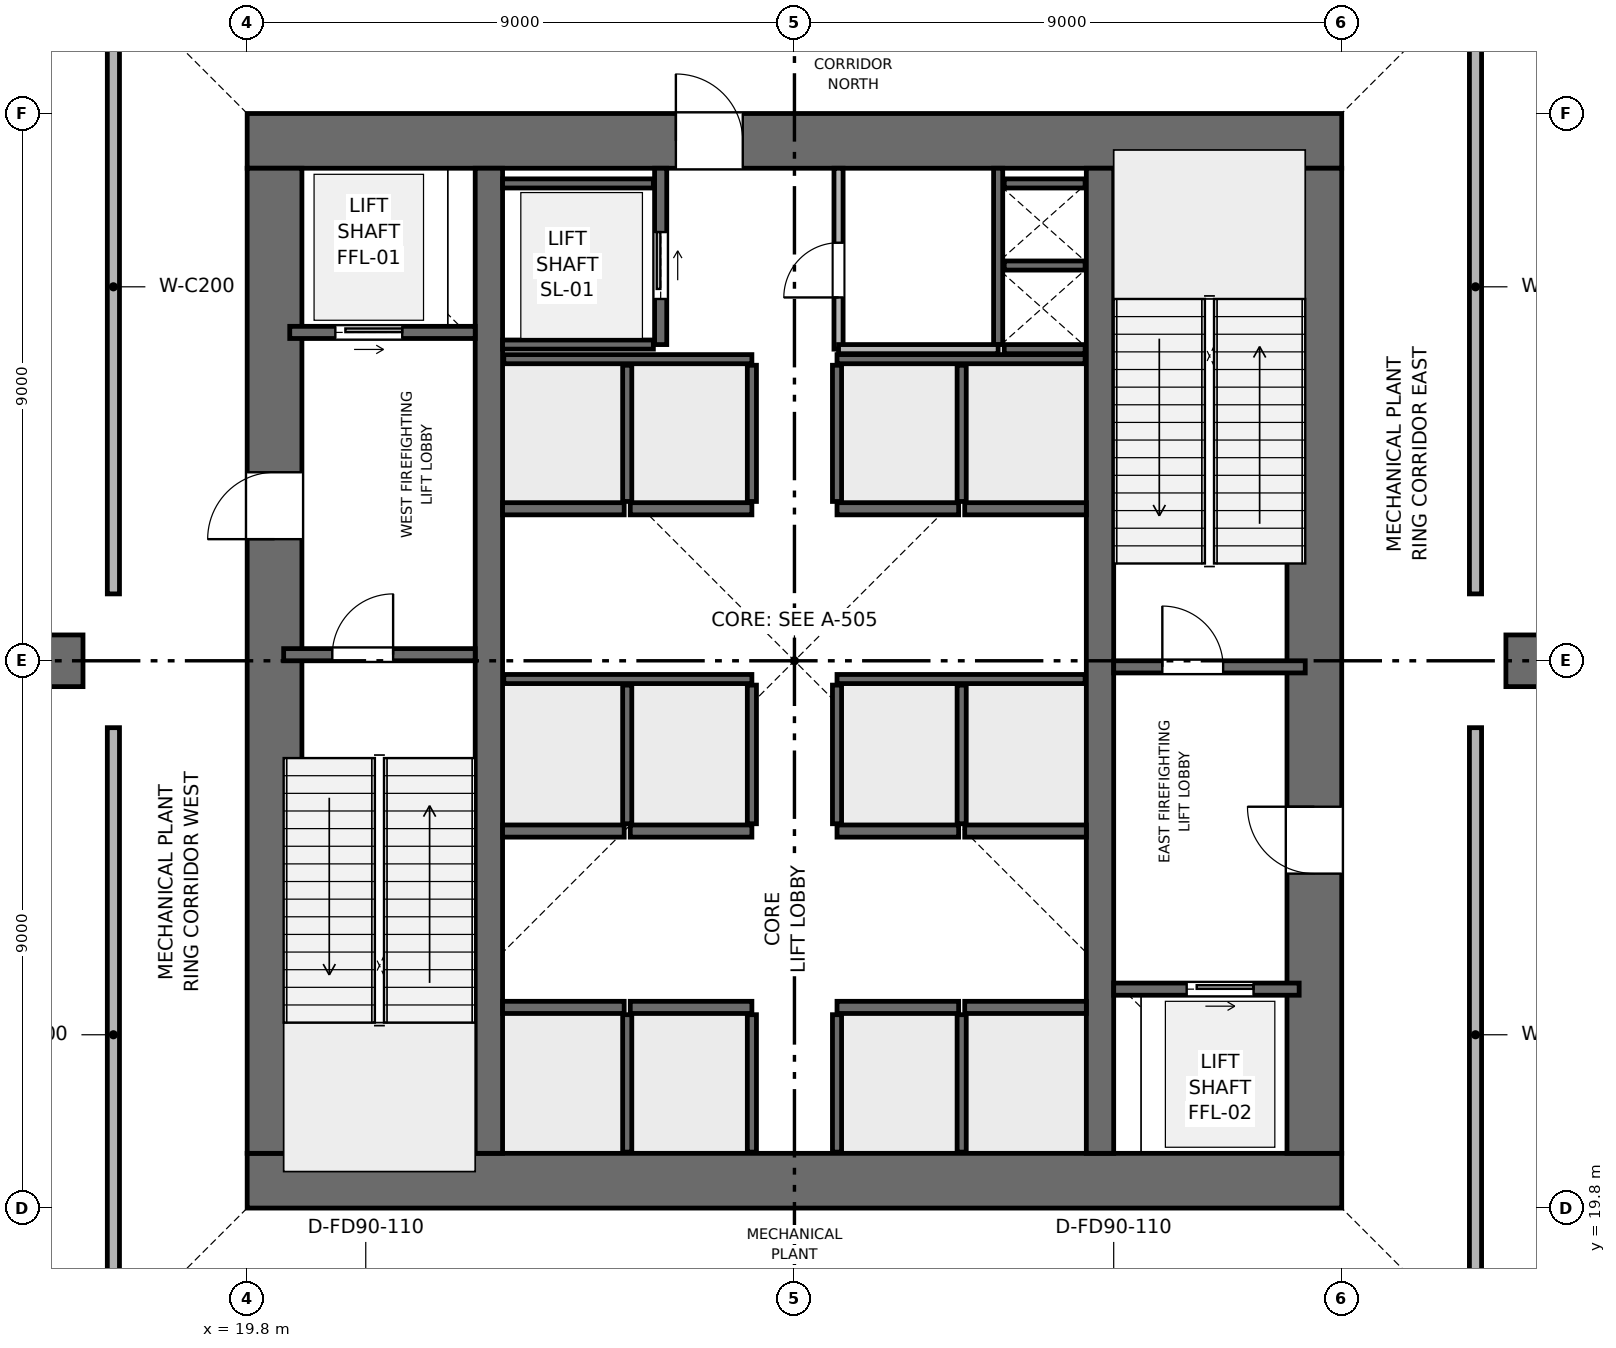
"""IFC4 building model, lengths in metres.
Left out: names, types, materials, properties, quantities, classifications, styles, units other than length and angle.
Written with IfcOpenShell. Run it as: python <this file> out.ifc"""

import sys

from ifc_helpers import new_model, si_unit, direction, frame, frame_2d, origin, place, context, subcontext, project, spatial, rectangle, extrude, element, fill, save


model = new_model("IFC4")
c1 = context("Model", 3, precision=1e-05, world=origin(), true_north=direction((0.0, 1.0)))
c2 = subcontext(c1, "Body", "Model", "MODEL_VIEW")
j1 = project(units=[si_unit("LENGTHUNIT", "METRE"), si_unit("PLANEANGLEUNIT", "RADIAN")], contexts=[c1])
p1 = place(None, origin())
s1 = spatial("IfcSite", under=j1, at=p1, CompositionType="ELEMENT")
p2 = place(p1, origin())
s2 = spatial("IfcBuilding", under=s1, at=p2, CompositionType="ELEMENT")
p3 = place(p2, frame((0.0, 0.0, 108.0)))
s3 = spatial("IfcBuildingStorey", under=s2, at=p3, CompositionType="ELEMENT", Elevation=108.0)
p4 = place(p3, frame((19.8, 20.25, 0.0), z_axis=(0.0, 0.0, 1.0), x_axis=(1.0, 0.0, 0.0)))
e1 = element("IfcWall", 1, at=p4, inside=s3, PredefinedType="SHEAR", context=c2, shape_type="SweptSolid", body=[
    extrude(rectangle(XDim=18.0, YDim=0.9, at=frame_2d((9.0, 0.0))), origin(), (0.0, 0.0, 1.0), 5.4),
])
p5 = place(p3, frame((19.8, 37.35, 0.0), z_axis=(0.0, 0.0, 1.0), x_axis=(1.0, 0.0, 0.0)))
e2 = element("IfcWall", 2, at=p5, inside=s3, PredefinedType="SHEAR", context=c2, shape_type="SweptSolid", body=[
    extrude(rectangle(XDim=18.0, YDim=0.9, at=frame_2d((9.0, 0.0))), origin(), (0.0, 0.0, 1.0), 5.4),
])
p6 = place(p5, frame((7.05, 0.0, 0.0)))
e3 = element("IfcOpeningElement", 3, at=p6, cuts=e2, PredefinedType="OPENING", context=c2, shape_type="SweptSolid", body=[
    extrude(rectangle(XDim=1.1, YDim=2.15, at=frame_2d((0.55, 1.075))), frame((0.0, 0.46, 0.0), z_axis=(0.0, -1.0, 0.0), x_axis=(1.0, 0.0, 0.0)), (0.0, 0.0, 1.0), 0.92),
])
p7 = place(p3, frame((20.25, 20.7, 0.0), z_axis=(0.0, 0.0, 1.0), x_axis=(0.0, 1.0, 0.0)))
e4 = element("IfcWall", 4, at=p7, inside=s3, PredefinedType="SHEAR", context=c2, shape_type="SweptSolid", body=[
    extrude(rectangle(XDim=16.2, YDim=0.9, at=frame_2d((8.1, 0.0))), origin(), (0.0, 0.0, 1.0), 5.4),
])
p8 = place(p7, frame((10.1, 0.0, 0.0)))
e5 = element("IfcOpeningElement", 5, at=p8, cuts=e4, PredefinedType="OPENING", context=c2, shape_type="SweptSolid", body=[
    extrude(rectangle(XDim=1.1, YDim=2.15, at=frame_2d((0.55, 1.075))), frame((0.0, 0.46, 0.0), z_axis=(0.0, -1.0, 0.0), x_axis=(1.0, 0.0, 0.0)), (0.0, 0.0, 1.0), 0.92),
])
p9 = place(p3, frame((37.35, 20.7, 0.0), z_axis=(0.0, 0.0, 1.0), x_axis=(0.0, 1.0, 0.0)))
e6 = element("IfcWall", 6, at=p9, inside=s3, PredefinedType="SHEAR", context=c2, shape_type="SweptSolid", body=[
    extrude(rectangle(XDim=16.2, YDim=0.9, at=frame_2d((8.1, 0.0))), origin(), (0.0, 0.0, 1.0), 5.4),
])
p10 = place(p9, frame((4.6, 0.0, 0.0)))
e7 = element("IfcOpeningElement", 7, at=p10, cuts=e6, PredefinedType="OPENING", context=c2, shape_type="SweptSolid", body=[
    extrude(rectangle(XDim=1.1, YDim=2.15, at=frame_2d((0.55, 1.075))), frame((0.0, 0.46, 0.0), z_axis=(0.0, -1.0, 0.0), x_axis=(1.0, 0.0, 0.0)), (0.0, 0.0, 1.0), 0.92),
])
for number, where, z_axis, x_axis in (
    (8, (23.775, 20.7, 0.0), (0.0, 0.0, 1.0), (0.0, 1.0, 0.0)),
    (9, (33.825, 20.7, 0.0), (0.0, 0.0, 1.0), (0.0, 1.0, 0.0)),
):
    element("IfcWall", number, at=place(p3, frame(where, z_axis=z_axis, x_axis=x_axis)), inside=s3, PredefinedType="SHEAR", context=c2, shape_type="SweptSolid", body=[
        extrude(rectangle(XDim=16.2, YDim=0.45, at=frame_2d((8.1, 0.0))), origin(), (0.0, 0.0, 1.0), 5.4),
    ])
for number, where, z_axis, x_axis in (
    (10, (17.1, 28.8, 0.0), (0.0, 0.0, 1.0), (-1.0, 0.0, 0.0)),
    (11, (40.5, 28.8, 0.0), (0.0, 0.0, 1.0), (1.0, 0.0, 0.0)),
):
    element("IfcWall", number, at=place(p3, frame(where, z_axis=z_axis, x_axis=x_axis)), inside=s3, PredefinedType="SHEAR", context=c2, shape_type="SweptSolid", body=[
        extrude(rectangle(XDim=12.55, YDim=0.85, at=frame_2d((6.275, 0.0))), origin(), (0.0, 0.0, 1.0), 5.15),
    ])
p11 = place(p3, frame((20.4, 28.9, 0.0), z_axis=(0.0, 0.0, 1.0), x_axis=(1.0, 0.0, 0.0)))
e12 = element("IfcWall", 12, at=p11, inside=s3, PredefinedType="SHEAR", context=c2, shape_type="SweptSolid", body=[
    extrude(rectangle(XDim=3.15, YDim=0.2, at=frame_2d((1.575, 0.0))), origin(), (0.0, 0.0, 1.0), 5.15),
])
p12 = place(p11, frame((0.8, 0.0, 0.0)))
e13 = element("IfcOpeningElement", 13, at=p12, cuts=e12, PredefinedType="OPENING", context=c2, shape_type="SweptSolid", body=[
    extrude(rectangle(XDim=1.0, YDim=2.1, at=frame_2d((0.5, 1.05))), frame((0.0, 0.11, 0.0), z_axis=(0.0, -1.0, 0.0), x_axis=(1.0, 0.0, 0.0)), (0.0, 0.0, 1.0), 0.22),
])
p13 = place(p3, frame((34.05, 28.7, 0.0), z_axis=(0.0, 0.0, 1.0), x_axis=(1.0, 0.0, 0.0)))
e14 = element("IfcWall", 14, at=p13, inside=s3, PredefinedType="SHEAR", context=c2, shape_type="SweptSolid", body=[
    extrude(rectangle(XDim=3.15, YDim=0.2, at=frame_2d((1.575, 0.0))), origin(), (0.0, 0.0, 1.0), 5.15),
])
p14 = place(p13, frame((0.8, 0.0, 0.0)))
e15 = element("IfcOpeningElement", 15, at=p14, cuts=e14, PredefinedType="OPENING", context=c2, shape_type="SweptSolid", body=[
    extrude(rectangle(XDim=1.0, YDim=2.1, at=frame_2d((0.5, 1.05))), frame((0.0, 0.11, 0.0), z_axis=(0.0, -1.0, 0.0), x_axis=(1.0, 0.0, 0.0)), (0.0, 0.0, 1.0), 0.22),
])
p15 = place(p3, frame((32.15, 34.0, 0.0), z_axis=(0.0, 0.0, 1.0), x_axis=(0.0, 1.0, 0.0)))
e16 = element("IfcWall", 16, at=p15, inside=s3, PredefinedType="SHEAR", context=c2, shape_type="SweptSolid", body=[
    extrude(rectangle(XDim=2.9, YDim=0.15, at=frame_2d((1.45, 0.0))), origin(), (0.0, 0.0, 1.0), 5.15),
])
for number, where, z_axis, x_axis in (
    (17, (32.25, 33.925, 0.0), (0.0, 0.0, 1.0), (1.0, 0.0, 0.0)),
    (18, (32.25, 35.3, 0.0), (0.0, 0.0, 1.0), (1.0, 0.0, 0.0)),
):
    element("IfcWall", number, at=place(p3, frame(where, z_axis=z_axis, x_axis=x_axis)), inside=s3, PredefinedType="SHEAR", context=c2, shape_type="SweptSolid", body=[
        extrude(rectangle(XDim=1.33, YDim=0.15, at=frame_2d((0.665, 0.0))), origin(), (0.0, 0.0, 1.0), 5.15),
    ])
p16 = place(p3, frame((20.5, 34.2, 0.0), z_axis=(0.0, 0.0, 1.0), x_axis=(1.0, 0.0, 0.0)))
e19 = element("IfcWall", 19, at=p16, inside=s3, PredefinedType="SHEAR", context=c2, shape_type="SweptSolid", body=[
    extrude(rectangle(XDim=3.05, YDim=0.2, at=frame_2d((1.525, 0.0))), origin(), (0.0, 0.0, 1.0), 5.15),
])
p17 = place(p16, frame((0.75, 0.0, 0.0)))
e20 = element("IfcOpeningElement", 20, at=p17, cuts=e19, PredefinedType="OPENING", context=c2, shape_type="SweptSolid", body=[
    extrude(rectangle(XDim=1.1, YDim=2.15, at=frame_2d((0.55, 1.075))), frame((0.0, 0.11, 0.0), z_axis=(0.0, -1.0, 0.0), x_axis=(1.0, 0.0, 0.0)), (0.0, 0.0, 1.0), 0.22),
])
p18 = place(p3, frame((34.05, 23.4, 0.0), z_axis=(0.0, 0.0, 1.0), x_axis=(1.0, 0.0, 0.0)))
e21 = element("IfcWall", 21, at=p18, inside=s3, PredefinedType="SHEAR", context=c2, shape_type="SweptSolid", body=[
    extrude(rectangle(XDim=3.05, YDim=0.2, at=frame_2d((1.525, 0.0))), origin(), (0.0, 0.0, 1.0), 5.15),
])
p19 = place(p18, frame((1.2, 0.0, 0.0)))
e22 = element("IfcOpeningElement", 22, at=p19, cuts=e21, PredefinedType="OPENING", context=c2, shape_type="SweptSolid", body=[
    extrude(rectangle(XDim=1.1, YDim=2.15, at=frame_2d((0.55, 1.075))), frame((0.0, 0.11, 0.0), z_axis=(0.0, -1.0, 0.0), x_axis=(1.0, 0.0, 0.0)), (0.0, 0.0, 1.0), 0.22),
])
p20 = place(p3, frame((26.6, 34.0, 0.0), z_axis=(0.0, 0.0, 1.0), x_axis=(0.0, 1.0, 0.0)))
e23 = element("IfcWall", 23, at=p20, inside=s3, PredefinedType="SHEAR", context=c2, shape_type="SweptSolid", body=[
    extrude(rectangle(XDim=2.9, YDim=0.2, at=frame_2d((1.45, 0.0))), origin(), (0.0, 0.0, 1.0), 5.15),
])
p21 = place(p20, frame((0.75, 0.0, 0.0)))
e24 = element("IfcOpeningElement", 24, at=p21, cuts=e23, PredefinedType="OPENING", context=c2, shape_type="SweptSolid", body=[
    extrude(rectangle(XDim=1.1, YDim=2.15, at=frame_2d((0.55, 1.075))), frame((0.0, 0.11, 0.0), z_axis=(0.0, -1.0, 0.0), x_axis=(1.0, 0.0, 0.0)), (0.0, 0.0, 1.0), 0.22),
])
for number, where, z_axis, x_axis in (
    (25, (24.0, 34.0, 0.0), (0.0, 0.0, 1.0), (1.0, 0.0, 0.0)),
    (26, (24.0, 36.65, 0.0), (0.0, 0.0, 1.0), (1.0, 0.0, 0.0)),
):
    element("IfcWall", number, at=place(p3, frame(where, z_axis=z_axis, x_axis=x_axis)), inside=s3, PredefinedType="SHEAR", context=c2, shape_type="SweptSolid", body=[
        extrude(rectangle(XDim=2.48, YDim=0.15, at=frame_2d((1.24, 0.0))), origin(), (0.0, 0.0, 1.0), 5.15),
    ])
for number, where, z_axis, x_axis in (
    (27, (24.0, 23.1, 0.0), (0.0, 0.0, 1.0), (1.0, 0.0, 0.0)),
    (28, (26.1, 23.1, 0.0), (0.0, 0.0, 1.0), (1.0, 0.0, 0.0)),
    (29, (29.5, 23.1, 0.0), (0.0, 0.0, 1.0), (1.0, 0.0, 0.0)),
    (30, (31.6, 23.1, 0.0), (0.0, 0.0, 1.0), (1.0, 0.0, 0.0)),
    (31, (24.0, 26.0, 0.0), (0.0, 0.0, 1.0), (1.0, 0.0, 0.0)),
    (32, (26.1, 26.0, 0.0), (0.0, 0.0, 1.0), (1.0, 0.0, 0.0)),
    (33, (29.5, 26.0, 0.0), (0.0, 0.0, 1.0), (1.0, 0.0, 0.0)),
    (34, (31.6, 26.0, 0.0), (0.0, 0.0, 1.0), (1.0, 0.0, 0.0)),
    (35, (24.0, 31.3, 0.0), (0.0, 0.0, 1.0), (1.0, 0.0, 0.0)),
    (36, (26.1, 31.3, 0.0), (0.0, 0.0, 1.0), (1.0, 0.0, 0.0)),
    (37, (29.5, 31.3, 0.0), (0.0, 0.0, 1.0), (1.0, 0.0, 0.0)),
    (38, (31.6, 31.3, 0.0), (0.0, 0.0, 1.0), (1.0, 0.0, 0.0)),
):
    element("IfcWall", number, at=place(p3, frame(where, z_axis=z_axis, x_axis=x_axis)), inside=s3, PredefinedType="SHEAR", context=c2, shape_type="SweptSolid", body=[
        extrude(rectangle(XDim=2.0, YDim=0.2, at=frame_2d((1.0, 0.0))), origin(), (0.0, 0.0, 1.0), 5.15),
    ])
p22 = place(p3, frame((32.25, 36.65, 0.0), z_axis=(0.0, 0.0, 1.0), x_axis=(1.0, 0.0, 0.0)))
e39 = element("IfcWall", 39, at=p22, inside=s3, PredefinedType="SHEAR", context=c2, shape_type="SweptSolid", body=[
    extrude(rectangle(XDim=1.33, YDim=0.15, at=frame_2d((0.665, 0.0))), origin(), (0.0, 0.0, 1.0), 5.15),
])
for number, where, z_axis, x_axis in (
    (40, (26.05, 20.72, 0.0), (0.0, 0.0, 1.0), (0.0, 1.0, 0.0)),
    (41, (28.1, 20.72, 0.0), (0.0, 0.0, 1.0), (0.0, 1.0, 0.0)),
    (42, (29.5, 20.72, 0.0), (0.0, 0.0, 1.0), (0.0, 1.0, 0.0)),
    (43, (31.55, 20.72, 0.0), (0.0, 0.0, 1.0), (0.0, 1.0, 0.0)),
):
    element("IfcWall", number, at=place(p3, frame(where, z_axis=z_axis, x_axis=x_axis)), inside=s3, PredefinedType="SHEAR", context=c2, shape_type="SweptSolid", body=[
        extrude(rectangle(XDim=2.26, YDim=0.15, at=frame_2d((1.13, 0.0))), origin(), (0.0, 0.0, 1.0), 5.15),
    ])
for number, where, z_axis, x_axis in (
    (44, (24.02, 28.5, 0.0), (0.0, 0.0, 1.0), (1.0, 0.0, 0.0)),
    (45, (29.5, 28.5, 0.0), (0.0, 0.0, 1.0), (1.0, 0.0, 0.0)),
):
    element("IfcWall", number, at=place(p3, frame(where, z_axis=z_axis, x_axis=x_axis)), inside=s3, PredefinedType="SHEAR", context=c2, shape_type="SweptSolid", body=[
        extrude(rectangle(XDim=4.08, YDim=0.15, at=frame_2d((2.04, 0.0))), origin(), (0.0, 0.0, 1.0), 5.15),
    ])
for number, where, z_axis, x_axis in (
    (46, (26.05, 26.12, 0.0), (0.0, 0.0, 1.0), (0.0, 1.0, 0.0)),
    (47, (28.1, 26.12, 0.0), (0.0, 0.0, 1.0), (0.0, 1.0, 0.0)),
    (48, (29.5, 26.12, 0.0), (0.0, 0.0, 1.0), (0.0, 1.0, 0.0)),
    (49, (31.55, 26.12, 0.0), (0.0, 0.0, 1.0), (0.0, 1.0, 0.0)),
):
    element("IfcWall", number, at=place(p3, frame(where, z_axis=z_axis, x_axis=x_axis)), inside=s3, PredefinedType="SHEAR", context=c2, shape_type="SweptSolid", body=[
        extrude(rectangle(XDim=2.28, YDim=0.15, at=frame_2d((1.14, 0.0))), origin(), (0.0, 0.0, 1.0), 5.15),
    ])
for number, where, z_axis, x_axis in (
    (50, (24.02, 33.76, 0.0), (0.0, 0.0, 1.0), (1.0, 0.0, 0.0)),
    (51, (29.5, 33.76, 0.0), (0.0, 0.0, 1.0), (1.0, 0.0, 0.0)),
):
    element("IfcWall", number, at=place(p3, frame(where, z_axis=z_axis, x_axis=x_axis)), inside=s3, PredefinedType="SHEAR", context=c2, shape_type="SweptSolid", body=[
        extrude(rectangle(XDim=4.08, YDim=0.15, at=frame_2d((2.04, 0.0))), origin(), (0.0, 0.0, 1.0), 5.15),
    ])
for number, where, z_axis, x_axis in (
    (52, (26.05, 31.42, 0.0), (0.0, 0.0, 1.0), (0.0, 1.0, 0.0)),
    (53, (28.1, 31.42, 0.0), (0.0, 0.0, 1.0), (0.0, 1.0, 0.0)),
    (54, (29.5, 31.42, 0.0), (0.0, 0.0, 1.0), (0.0, 1.0, 0.0)),
    (55, (31.55, 31.42, 0.0), (0.0, 0.0, 1.0), (0.0, 1.0, 0.0)),
):
    element("IfcWall", number, at=place(p3, frame(where, z_axis=z_axis, x_axis=x_axis)), inside=s3, PredefinedType="SHEAR", context=c2, shape_type="SweptSolid", body=[
        extrude(rectangle(XDim=2.24, YDim=0.15, at=frame_2d((1.12, 0.0))), origin(), (0.0, 0.0, 1.0), 5.15),
    ])
p23 = place(p3, frame((29.525, 33.925, 0.0), z_axis=(0.0, 0.0, 1.0), x_axis=(0.0, 1.0, 0.0)))
e56 = element("IfcWall", 56, at=p23, inside=s3, PredefinedType="PARTITIONING", context=c2, shape_type="SweptSolid", body=[
    extrude(rectangle(XDim=2.975, YDim=0.15, at=frame_2d((1.487, 0.0))), origin(), (0.0, 0.0, 1.0), 5.15),
])
p24 = place(p23, frame((0.85, 0.0, 0.0)))
e57 = element("IfcOpeningElement", 57, at=p24, cuts=e56, PredefinedType="OPENING", context=c2, shape_type="SweptSolid", body=[
    extrude(rectangle(XDim=0.9, YDim=2.1, at=frame_2d((0.45, 1.05))), frame((0.0, 0.085, 0.0), z_axis=(0.0, -1.0, 0.0), x_axis=(1.0, 0.0, 0.0)), (0.0, 0.0, 1.0), 0.17),
])
p25 = place(p3, frame((29.525, 33.925, 0.0), z_axis=(0.0, 0.0, 1.0), x_axis=(1.0, 0.0, 0.0)))
e58 = element("IfcWall", 58, at=p25, inside=s3, PredefinedType="PARTITIONING", context=c2, shape_type="SweptSolid", body=[
    extrude(rectangle(XDim=2.625, YDim=0.15, at=frame_2d((1.312, 0.0))), origin(), (0.0, 0.0, 1.0), 5.15),
])
p26 = place(p3, frame((17.6, 17.6, 0.0), z_axis=(0.0, 0.0, 1.0), x_axis=(0.0, 1.0, 0.0)))
e59 = element("IfcWall", 59, at=p26, inside=s3, PredefinedType="PARTITIONING", context=c2, shape_type="SweptSolid", body=[
    extrude(rectangle(XDim=10.1, YDim=0.2, at=frame_2d((5.05, 0.0))), origin(), (0.0, 0.0, 1.0), 4.685),
])
p27 = place(p3, frame((17.6, 29.9, 0.0), z_axis=(0.0, 0.0, 1.0), x_axis=(0.0, 1.0, 0.0)))
e60 = element("IfcWall", 60, at=p27, inside=s3, PredefinedType="PARTITIONING", context=c2, shape_type="SweptSolid", body=[
    extrude(rectangle(XDim=10.1, YDim=0.2, at=frame_2d((5.05, 0.0))), origin(), (0.0, 0.0, 1.0), 4.685),
])
p28 = place(p3, frame((40.0, 17.6, 0.0), z_axis=(0.0, 0.0, 1.0), x_axis=(0.0, 1.0, 0.0)))
e61 = element("IfcWall", 61, at=p28, inside=s3, PredefinedType="PARTITIONING", context=c2, shape_type="SweptSolid", body=[
    extrude(rectangle(XDim=10.1, YDim=0.2, at=frame_2d((5.05, 0.0))), origin(), (0.0, 0.0, 1.0), 4.685),
])
p29 = place(p3, frame((40.0, 29.9, 0.0), z_axis=(0.0, 0.0, 1.0), x_axis=(0.0, 1.0, 0.0)))
e62 = element("IfcWall", 62, at=p29, inside=s3, PredefinedType="PARTITIONING", context=c2, shape_type="SweptSolid", body=[
    extrude(rectangle(XDim=10.1, YDim=0.2, at=frame_2d((5.05, 0.0))), origin(), (0.0, 0.0, 1.0), 4.685),
])
p30 = place(p12, origin())
e63 = element("IfcDoor", 63, at=p30, inside=s3, OperationType="SINGLE_SWING_RIGHT", PredefinedType="DOOR", context=c2, shape_type="SweptSolid", body=[
    extrude(rectangle(XDim=1.0, YDim=2.1, at=frame_2d((0.5, 1.05))), frame((0.0, 0.025, 0.0), z_axis=(0.0, -1.0, 0.0), x_axis=(1.0, 0.0, 0.0)), (0.0, 0.0, 1.0), 0.05),
])
fill(e13, e63)
p31 = place(p14, origin())
e64 = element("IfcDoor", 64, at=p31, inside=s3, OperationType="SINGLE_SWING_LEFT", PredefinedType="DOOR", context=c2, shape_type="SweptSolid", body=[
    extrude(rectangle(XDim=1.0, YDim=2.1, at=frame_2d((0.5, 1.05))), frame((0.0, 0.025, 0.0), z_axis=(0.0, -1.0, 0.0), x_axis=(1.0, 0.0, 0.0)), (0.0, 0.0, 1.0), 0.05),
])
fill(e15, e64)
p32 = place(p17, origin())
e65 = element("IfcDoor", 65, at=p32, inside=s3, OperationType="SLIDING_TO_RIGHT", PredefinedType="DOOR", context=c2, shape_type="SweptSolid", body=[
    extrude(rectangle(XDim=1.1, YDim=2.15, at=frame_2d((0.55, 1.075))), frame((0.0, 0.025, 0.0), z_axis=(0.0, -1.0, 0.0), x_axis=(1.0, 0.0, 0.0)), (0.0, 0.0, 1.0), 0.05),
])
fill(e20, e65)
p33 = place(p19, origin())
e66 = element("IfcDoor", 66, at=p33, inside=s3, OperationType="SLIDING_TO_RIGHT", PredefinedType="DOOR", context=c2, shape_type="SweptSolid", body=[
    extrude(rectangle(XDim=1.1, YDim=2.15, at=frame_2d((0.55, 1.075))), frame((0.0, 0.025, 0.0), z_axis=(0.0, -1.0, 0.0), x_axis=(1.0, 0.0, 0.0)), (0.0, 0.0, 1.0), 0.05),
])
fill(e22, e66)
p34 = place(p21, origin())
e67 = element("IfcDoor", 67, at=p34, inside=s3, OperationType="SLIDING_TO_RIGHT", PredefinedType="DOOR", context=c2, shape_type="SweptSolid", body=[
    extrude(rectangle(XDim=1.1, YDim=2.15, at=frame_2d((0.55, 1.075))), frame((0.0, 0.025, 0.0), z_axis=(0.0, -1.0, 0.0), x_axis=(1.0, 0.0, 0.0)), (0.0, 0.0, 1.0), 0.05),
])
fill(e24, e67)
p35 = place(p24, origin())
e68 = element("IfcDoor", 68, at=p35, inside=s3, OperationType="SINGLE_SWING_LEFT", PredefinedType="DOOR", context=c2, shape_type="SweptSolid", body=[
    extrude(rectangle(XDim=0.9, YDim=2.1, at=frame_2d((0.45, 1.05))), frame((0.0, 0.025, 0.0), z_axis=(0.0, -1.0, 0.0), x_axis=(1.0, 0.0, 0.0)), (0.0, 0.0, 1.0), 0.05),
])
fill(e57, e68)
p36 = place(p8, origin())
e69 = element("IfcDoor", 69, at=p36, inside=s3, OperationType="SINGLE_SWING_LEFT", PredefinedType="DOOR", context=c2, shape_type="SweptSolid", body=[
    extrude(rectangle(XDim=1.1, YDim=2.15, at=frame_2d((0.55, 1.075))), frame((0.0, 0.025, 0.0), z_axis=(0.0, -1.0, 0.0), x_axis=(1.0, 0.0, 0.0)), (0.0, 0.0, 1.0), 0.05),
])
fill(e5, e69)
p37 = place(p10, origin())
e70 = element("IfcDoor", 70, at=p37, inside=s3, OperationType="SINGLE_SWING_RIGHT", PredefinedType="DOOR", context=c2, shape_type="SweptSolid", body=[
    extrude(rectangle(XDim=1.1, YDim=2.15, at=frame_2d((0.55, 1.075))), frame((0.0, 0.025, 0.0), z_axis=(0.0, -1.0, 0.0), x_axis=(1.0, 0.0, 0.0)), (0.0, 0.0, 1.0), 0.05),
])
fill(e7, e70)
p38 = place(p6, origin())
e71 = element("IfcDoor", 71, at=p38, inside=s3, OperationType="SINGLE_SWING_LEFT", PredefinedType="DOOR", context=c2, shape_type="SweptSolid", body=[
    extrude(rectangle(XDim=1.1, YDim=2.15, at=frame_2d((0.55, 1.075))), frame((0.0, 0.025, 0.0), z_axis=(0.0, -1.0, 0.0), x_axis=(1.0, 0.0, 0.0)), (0.0, 0.0, 1.0), 0.05),
])
fill(e3, e71)
save(model, sys.argv[1])
